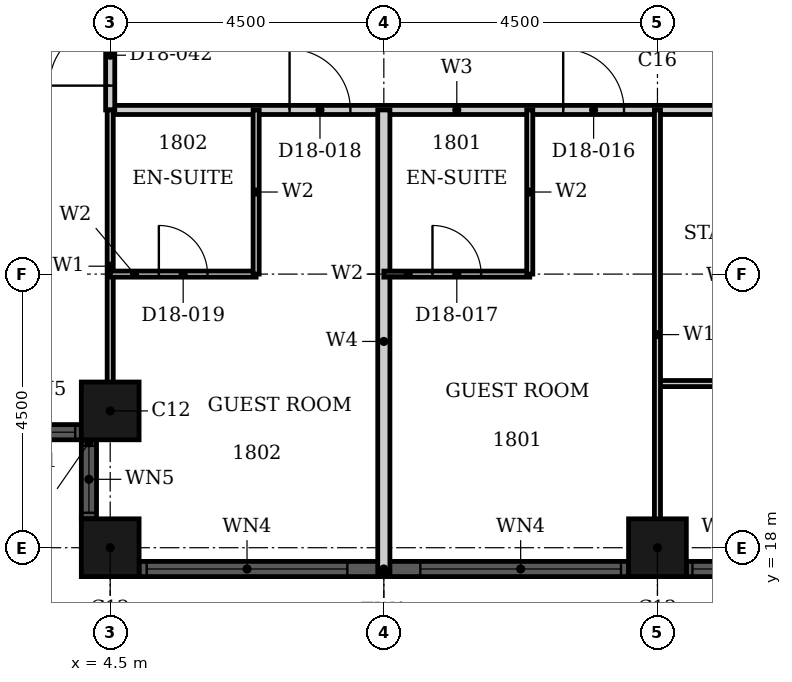
"""IFC4 building model, lengths in metres.
Left out: names, types, materials, properties, quantities, classifications, styles, units other than length and angle.
Written with IfcOpenShell. Run it as: python <this file> out.ifc"""

import sys

from ifc_helpers import new_model, si_unit, direction, frame, frame_2d, origin, origin_2d, place, context, subcontext, project, spatial, rectangle, hollow_rectangle, extrude, element, fill, save


model = new_model("IFC4")
c1 = context("Model", 3, precision=1e-05, world=origin(), true_north=direction((0.0, 1.0)))
c2 = subcontext(c1, "Body", "Model", "MODEL_VIEW")
j1 = project(units=[si_unit("LENGTHUNIT", "METRE"), si_unit("PLANEANGLEUNIT", "RADIAN")], contexts=[c1])
p1 = place(None, origin())
s1 = spatial("IfcSite", under=j1, at=p1, CompositionType="ELEMENT")
p2 = place(p1, origin())
s2 = spatial("IfcBuilding", under=s1, at=p2, CompositionType="ELEMENT")
p3 = place(p2, frame((0.0, 0.0, 78.0)))
s3 = spatial("IfcBuildingStorey", under=s2, at=p3, CompositionType="ELEMENT", Elevation=78.0)
for number, where, z_axis, x_axis in (
    (1, (4.5, 20.25, 0.0), (0.0, 0.0, 1.0), (1.0, 0.0, 0.0)),
    (2, (4.5, 18.0, 0.0), (0.0, 0.0, 1.0), (1.0, 0.0, 0.0)),
    (3, (13.5, 18.0, 0.0), (0.0, 0.0, 1.0), (1.0, 0.0, 0.0)),
):
    element("IfcColumn", number, at=place(p3, frame(where, z_axis=z_axis, x_axis=x_axis)), inside=s3, PredefinedType="COLUMN", context=c2, shape_type="SweptSolid", body=[
        extrude(hollow_rectangle(XDim=0.95, YDim=0.95, WallThickness=0.03, at=origin_2d()), origin(), (0.0, 0.0, 1.0), 3.6),
    ])
p4 = place(p3, frame((2.725, 19.9, 0.0), z_axis=(0.0, 0.0, 1.0), x_axis=(1.0, 0.0, 0.0)))
e4 = element("IfcWall", 4, at=p4, inside=s3, PredefinedType="SOLIDWALL", context=c2, shape_type="SweptSolid", body=[
    extrude(rectangle(XDim=1.3, YDim=0.25, at=frame_2d((0.65, 0.0))), origin(), (0.0, 0.0, 1.0), 3.6),
])
p5 = place(p4, frame((0.1, 0.0, 0.9)))
e5 = element("IfcOpeningElement", 5, at=p5, cuts=e4, PredefinedType="OPENING", context=c2, shape_type="SweptSolid", body=[
    extrude(rectangle(XDim=1.1, YDim=2.08, at=frame_2d((0.55, 1.04))), frame((0.0, 0.135, 0.0), z_axis=(0.0, -1.0, 0.0), x_axis=(1.0, 0.0, 0.0)), (0.0, 0.0, 1.0), 0.27),
])
p6 = place(p3, frame((4.15, 19.775, 0.0), z_axis=(0.0, 0.0, 1.0), x_axis=(0.0, -1.0, 0.0)))
e6 = element("IfcWall", 6, at=p6, inside=s3, PredefinedType="SOLIDWALL", context=c2, shape_type="SweptSolid", body=[
    extrude(rectangle(XDim=1.3, YDim=0.25, at=frame_2d((0.65, 0.0))), origin(), (0.0, 0.0, 1.0), 3.6),
])
p7 = place(p6, frame((0.1, 0.0, 0.9)))
e7 = element("IfcOpeningElement", 7, at=p7, cuts=e6, PredefinedType="OPENING", context=c2, shape_type="SweptSolid", body=[
    extrude(rectangle(XDim=1.1, YDim=2.08, at=frame_2d((0.55, 1.04))), frame((0.0, 0.135, 0.0), z_axis=(0.0, -1.0, 0.0), x_axis=(1.0, 0.0, 0.0)), (0.0, 0.0, 1.0), 0.27),
])
p8 = place(p3, frame((4.975, 17.65, 0.0), z_axis=(0.0, 0.0, 1.0), x_axis=(1.0, 0.0, 0.0)))
e8 = element("IfcWall", 8, at=p8, inside=s3, PredefinedType="SOLIDWALL", context=c2, shape_type="SweptSolid", body=[
    extrude(rectangle(XDim=8.05, YDim=0.25, at=frame_2d((4.025, 0.0))), origin(), (0.0, 0.0, 1.0), 3.6),
])
p9 = place(p8, frame((0.125, 0.0, 0.9)))
e9 = element("IfcOpeningElement", 9, at=p9, cuts=e8, PredefinedType="OPENING", context=c2, shape_type="SweptSolid", body=[
    extrude(rectangle(XDim=3.3, YDim=2.08, at=frame_2d((1.65, 1.04))), frame((0.0, 0.135, 0.0), z_axis=(0.0, -1.0, 0.0), x_axis=(1.0, 0.0, 0.0)), (0.0, 0.0, 1.0), 0.27),
])
p10 = place(p8, frame((4.625, 0.0, 0.9)))
e10 = element("IfcOpeningElement", 10, at=p10, cuts=e8, PredefinedType="OPENING", context=c2, shape_type="SweptSolid", body=[
    extrude(rectangle(XDim=3.3, YDim=2.08, at=frame_2d((1.65, 1.04))), frame((0.0, 0.135, 0.0), z_axis=(0.0, -1.0, 0.0), x_axis=(1.0, 0.0, 0.0)), (0.0, 0.0, 1.0), 0.27),
])
p11 = place(p3, frame((13.975, 17.65, 0.0), z_axis=(0.0, 0.0, 1.0), x_axis=(1.0, 0.0, 0.0)))
e11 = element("IfcWall", 11, at=p11, inside=s3, PredefinedType="SOLIDWALL", context=c2, shape_type="SweptSolid", body=[
    extrude(rectangle(XDim=1.3, YDim=0.25, at=frame_2d((0.65, 0.0))), origin(), (0.0, 0.0, 1.0), 3.6),
])
p12 = place(p11, frame((0.1, 0.0, 0.9)))
e12 = element("IfcOpeningElement", 12, at=p12, cuts=e11, PredefinedType="OPENING", context=c2, shape_type="SweptSolid", body=[
    extrude(rectangle(XDim=1.1, YDim=2.08, at=frame_2d((0.55, 1.04))), frame((0.0, 0.135, 0.0), z_axis=(0.0, -1.0, 0.0), x_axis=(1.0, 0.0, 0.0)), (0.0, 0.0, 1.0), 0.27),
])
p13 = place(p3, frame((4.5, 25.2, 0.0), z_axis=(0.0, 0.0, 1.0), x_axis=(1.0, 0.0, 0.0)))
e13 = element("IfcWall", 13, at=p13, inside=s3, PredefinedType="PARTITIONING", context=c2, shape_type="SweptSolid", body=[
    extrude(rectangle(XDim=11.7, YDim=0.15, at=frame_2d((5.85, 0.0))), origin(), (0.0, 0.0, 1.0), 3.3),
])
p14 = place(p13, frame((7.45, 0.0, 0.0)))
e14 = element("IfcOpeningElement", 14, at=p14, cuts=e13, PredefinedType="OPENING", context=c2, shape_type="SweptSolid", body=[
    extrude(rectangle(XDim=1.0, YDim=2.1, at=frame_2d((0.5, 1.05))), frame((0.0, 0.085, 0.0), z_axis=(0.0, -1.0, 0.0), x_axis=(1.0, 0.0, 0.0)), (0.0, 0.0, 1.0), 0.17),
])
p15 = place(p13, frame((2.95, 0.0, 0.0)))
e15 = element("IfcOpeningElement", 15, at=p15, cuts=e13, PredefinedType="OPENING", context=c2, shape_type="SweptSolid", body=[
    extrude(rectangle(XDim=1.0, YDim=2.1, at=frame_2d((0.5, 1.05))), frame((0.0, 0.085, 0.0), z_axis=(0.0, -1.0, 0.0), x_axis=(1.0, 0.0, 0.0)), (0.0, 0.0, 1.0), 0.17),
])
p16 = place(p3, frame((4.5, 25.2, 0.0), z_axis=(0.0, 0.0, 1.0), x_axis=(0.0, 1.0, 0.0)))
e16 = element("IfcWall", 16, at=p16, inside=s3, PredefinedType="PARTITIONING", context=c2, shape_type="SweptSolid", body=[
    extrude(rectangle(XDim=1.8, YDim=0.15, at=frame_2d((0.9, 0.0))), origin(), (0.0, 0.0, 1.0), 3.3),
])
p17 = place(p16, frame((0.4, 0.0, 0.0)))
e17 = element("IfcOpeningElement", 17, at=p17, cuts=e16, PredefinedType="OPENING", context=c2, shape_type="SweptSolid", body=[
    extrude(rectangle(XDim=1.0, YDim=2.1, at=frame_2d((0.5, 1.05))), frame((0.0, 0.085, 0.0), z_axis=(0.0, -1.0, 0.0), x_axis=(1.0, 0.0, 0.0)), (0.0, 0.0, 1.0), 0.17),
])
p18 = place(p3, frame((13.5, 20.7, 0.0), z_axis=(0.0, 0.0, 1.0), x_axis=(1.0, 0.0, 0.0)))
e18 = element("IfcWall", 18, at=p18, inside=s3, PredefinedType="PARTITIONING", context=c2, shape_type="SweptSolid", body=[
    extrude(rectangle(XDim=2.7, YDim=0.1, at=frame_2d((1.35, 0.0))), origin(), (0.0, 0.0, 1.0), 3.3),
])
p19 = place(p3, frame((13.5, 17.81, 0.0), z_axis=(0.0, 0.0, 1.0), x_axis=(0.0, 1.0, 0.0)))
e19 = element("IfcWall", 19, at=p19, inside=s3, PredefinedType="PARTITIONING", context=c2, shape_type="SweptSolid", body=[
    extrude(rectangle(XDim=7.39, YDim=0.1, at=frame_2d((3.695, 0.0))), origin(), (0.0, 0.0, 1.0), 2.38),
])
p20 = place(p3, frame((4.5, 20.06, 0.0), z_axis=(0.0, 0.0, 1.0), x_axis=(0.0, 1.0, 0.0)))
e20 = element("IfcWall", 20, at=p20, inside=s3, PredefinedType="PARTITIONING", context=c2, shape_type="SweptSolid", body=[
    extrude(rectangle(XDim=5.14, YDim=0.1, at=frame_2d((2.57, 0.0))), origin(), (0.0, 0.0, 1.0), 3.3),
])
p21 = place(p3, frame((9.0, 17.585, 0.0), z_axis=(0.0, 0.0, 1.0), x_axis=(0.0, 1.0, 0.0)))
e21 = element("IfcWall", 21, at=p21, inside=s3, PredefinedType="PARTITIONING", context=c2, shape_type="SweptSolid", body=[
    extrude(rectangle(XDim=7.615, YDim=0.2, at=frame_2d((3.808, 0.0))), origin(), (0.0, 0.0, 1.0), 3.3),
])
p22 = place(p3, frame((9.0, 22.5, 0.0), z_axis=(0.0, 0.0, 1.0), x_axis=(1.0, 0.0, 0.0)))
e22 = element("IfcWall", 22, at=p22, inside=s3, PredefinedType="PARTITIONING", context=c2, shape_type="SweptSolid", body=[
    extrude(rectangle(XDim=2.4, YDim=0.1, at=frame_2d((1.2, 0.0))), origin(), (0.0, 0.0, 1.0), 2.58),
])
p23 = place(p22, frame((0.8, 0.0, 0.0)))
e23 = element("IfcOpeningElement", 23, at=p23, cuts=e22, PredefinedType="OPENING", context=c2, shape_type="SweptSolid", body=[
    extrude(rectangle(XDim=0.8, YDim=2.1, at=frame_2d((0.4, 1.05))), frame((0.0, 0.06, 0.0), z_axis=(0.0, -1.0, 0.0), x_axis=(1.0, 0.0, 0.0)), (0.0, 0.0, 1.0), 0.12),
])
p24 = place(p3, frame((4.5, 22.5, 0.0), z_axis=(0.0, 0.0, 1.0), x_axis=(1.0, 0.0, 0.0)))
e24 = element("IfcWall", 24, at=p24, inside=s3, PredefinedType="PARTITIONING", context=c2, shape_type="SweptSolid", body=[
    extrude(rectangle(XDim=2.4, YDim=0.1, at=frame_2d((1.2, 0.0))), origin(), (0.0, 0.0, 1.0), 2.58),
])
p25 = place(p24, frame((0.8, 0.0, 0.0)))
e25 = element("IfcOpeningElement", 25, at=p25, cuts=e24, PredefinedType="OPENING", context=c2, shape_type="SweptSolid", body=[
    extrude(rectangle(XDim=0.8, YDim=2.1, at=frame_2d((0.4, 1.05))), frame((0.0, 0.06, 0.0), z_axis=(0.0, -1.0, 0.0), x_axis=(1.0, 0.0, 0.0)), (0.0, 0.0, 1.0), 0.12),
])
for number, where, z_axis, x_axis in (
    (26, (11.4, 22.5, 0.0), (0.0, 0.0, 1.0), (0.0, 1.0, 0.0)),
    (27, (6.9, 22.5, 0.0), (0.0, 0.0, 1.0), (0.0, 1.0, 0.0)),
):
    element("IfcWall", number, at=place(p3, frame(where, z_axis=z_axis, x_axis=x_axis)), inside=s3, PredefinedType="PARTITIONING", context=c2, shape_type="SweptSolid", body=[
        extrude(rectangle(XDim=2.7, YDim=0.1, at=frame_2d((1.35, 0.0))), origin(), (0.0, 0.0, 1.0), 3.3),
    ])
p26 = place(p5, origin())
e28 = element("IfcWindow", 28, at=p26, inside=s3, PartitioningType="SINGLE_PANEL", PredefinedType="WINDOW", context=c2, shape_type="SweptSolid", body=[
    extrude(rectangle(XDim=1.1, YDim=2.08, at=frame_2d((0.55, 1.04))), frame((0.0, 0.03, 0.0), z_axis=(0.0, -1.0, 0.0), x_axis=(1.0, 0.0, 0.0)), (0.0, 0.0, 1.0), 0.06),
])
fill(e5, e28)
p27 = place(p7, origin())
e29 = element("IfcWindow", 29, at=p27, inside=s3, PartitioningType="SINGLE_PANEL", PredefinedType="WINDOW", context=c2, shape_type="SweptSolid", body=[
    extrude(rectangle(XDim=1.1, YDim=2.08, at=frame_2d((0.55, 1.04))), frame((0.0, 0.03, 0.0), z_axis=(0.0, -1.0, 0.0), x_axis=(1.0, 0.0, 0.0)), (0.0, 0.0, 1.0), 0.06),
])
fill(e7, e29)
p28 = place(p9, origin())
e30 = element("IfcWindow", 30, at=p28, inside=s3, PartitioningType="SINGLE_PANEL", PredefinedType="WINDOW", context=c2, shape_type="SweptSolid", body=[
    extrude(rectangle(XDim=3.3, YDim=2.08, at=frame_2d((1.65, 1.04))), frame((0.0, 0.03, 0.0), z_axis=(0.0, -1.0, 0.0), x_axis=(1.0, 0.0, 0.0)), (0.0, 0.0, 1.0), 0.06),
])
fill(e9, e30)
p29 = place(p10, origin())
e31 = element("IfcWindow", 31, at=p29, inside=s3, PartitioningType="SINGLE_PANEL", PredefinedType="WINDOW", context=c2, shape_type="SweptSolid", body=[
    extrude(rectangle(XDim=3.3, YDim=2.08, at=frame_2d((1.65, 1.04))), frame((0.0, 0.03, 0.0), z_axis=(0.0, -1.0, 0.0), x_axis=(1.0, 0.0, 0.0)), (0.0, 0.0, 1.0), 0.06),
])
fill(e10, e31)
p30 = place(p12, origin())
e32 = element("IfcWindow", 32, at=p30, inside=s3, PartitioningType="SINGLE_PANEL", PredefinedType="WINDOW", context=c2, shape_type="SweptSolid", body=[
    extrude(rectangle(XDim=1.1, YDim=2.08, at=frame_2d((0.55, 1.04))), frame((0.0, 0.03, 0.0), z_axis=(0.0, -1.0, 0.0), x_axis=(1.0, 0.0, 0.0)), (0.0, 0.0, 1.0), 0.06),
])
fill(e12, e32)
p31 = place(p14, origin())
e33 = element("IfcDoor", 33, at=p31, inside=s3, OperationType="SINGLE_SWING_RIGHT", PredefinedType="DOOR", context=c2, shape_type="SweptSolid", body=[
    extrude(rectangle(XDim=1.0, YDim=2.1, at=frame_2d((0.5, 1.05))), frame((0.0, 0.025, 0.0), z_axis=(0.0, -1.0, 0.0), x_axis=(1.0, 0.0, 0.0)), (0.0, 0.0, 1.0), 0.05),
])
fill(e14, e33)
p32 = place(p23, origin())
e34 = element("IfcDoor", 34, at=p32, inside=s3, OperationType="SINGLE_SWING_LEFT", PredefinedType="DOOR", context=c2, shape_type="SweptSolid", body=[
    extrude(rectangle(XDim=0.8, YDim=2.1, at=frame_2d((0.4, 1.05))), frame((0.0, 0.025, 0.0), z_axis=(0.0, -1.0, 0.0), x_axis=(1.0, 0.0, 0.0)), (0.0, 0.0, 1.0), 0.05),
])
fill(e23, e34)
p33 = place(p15, origin())
e35 = element("IfcDoor", 35, at=p33, inside=s3, OperationType="SINGLE_SWING_RIGHT", PredefinedType="DOOR", context=c2, shape_type="SweptSolid", body=[
    extrude(rectangle(XDim=1.0, YDim=2.1, at=frame_2d((0.5, 1.05))), frame((0.0, 0.025, 0.0), z_axis=(0.0, -1.0, 0.0), x_axis=(1.0, 0.0, 0.0)), (0.0, 0.0, 1.0), 0.05),
])
fill(e15, e35)
p34 = place(p25, origin())
e36 = element("IfcDoor", 36, at=p34, inside=s3, OperationType="SINGLE_SWING_RIGHT", PredefinedType="DOOR", context=c2, shape_type="SweptSolid", body=[
    extrude(rectangle(XDim=0.8, YDim=2.1, at=frame_2d((0.4, 1.05))), frame((0.0, 0.025, 0.0), z_axis=(0.0, -1.0, 0.0), x_axis=(1.0, 0.0, 0.0)), (0.0, 0.0, 1.0), 0.05),
])
fill(e25, e36)
p35 = place(p17, origin())
e37 = element("IfcDoor", 37, at=p35, inside=s3, OperationType="SINGLE_SWING_LEFT", PredefinedType="DOOR", context=c2, shape_type="SweptSolid", body=[
    extrude(rectangle(XDim=1.0, YDim=2.1, at=frame_2d((0.5, 1.05))), frame((0.0, 0.025, 0.0), z_axis=(0.0, -1.0, 0.0), x_axis=(1.0, 0.0, 0.0)), (0.0, 0.0, 1.0), 0.05),
])
fill(e17, e37)
save(model, sys.argv[1])
